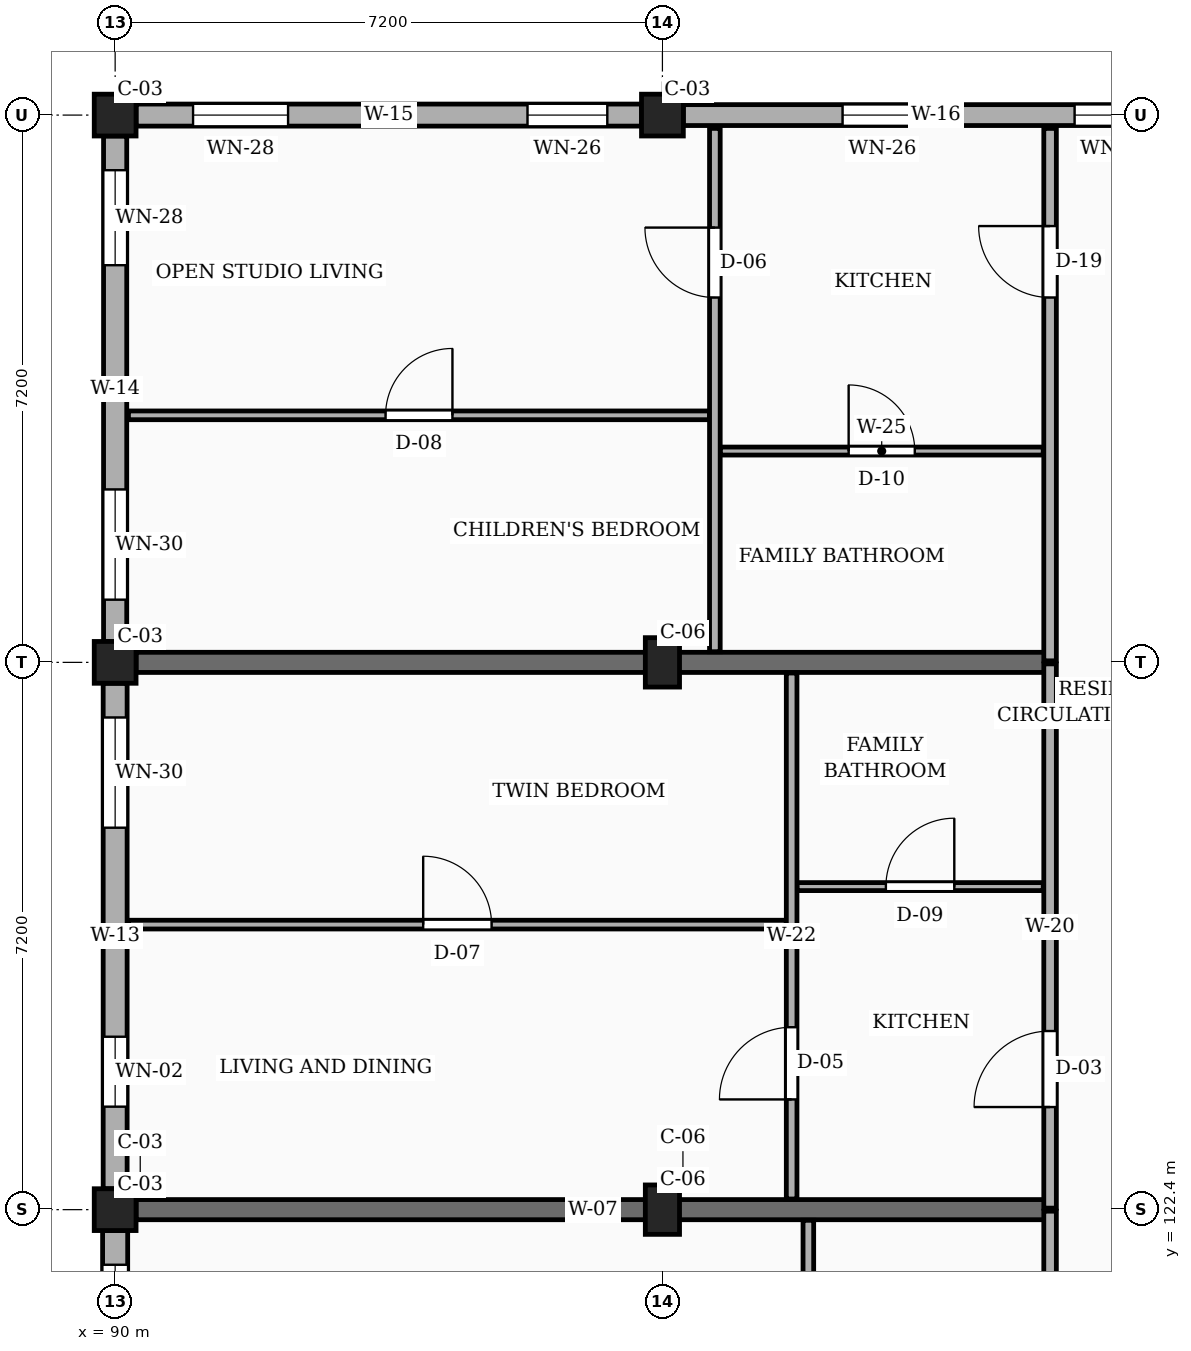
"""IFC4 building model, lengths in metres.
Left out: names, types, materials, properties, quantities, classifications, styles, units other than length and angle.
Written with IfcOpenShell. Run it as: python <this file> out.ifc"""

import sys

from ifc_helpers import new_model, si_unit, direction, frame, frame_2d, origin, origin_2d, place, context, subcontext, project, spatial, rectangle, extrude, element, fill, save


model = new_model("IFC4")
c1 = context("Model", 3, precision=1e-05, world=origin(), true_north=direction((0.0, 1.0)))
c2 = subcontext(c1, "Body", "Model", "MODEL_VIEW")
j1 = project(units=[si_unit("LENGTHUNIT", "METRE"), si_unit("PLANEANGLEUNIT", "RADIAN")], contexts=[c1])
p1 = place(None, origin())
s1 = spatial("IfcSite", under=j1, at=p1, CompositionType="ELEMENT")
p2 = place(p1, origin())
s2 = spatial("IfcBuilding", under=s1, at=p2, CompositionType="ELEMENT")
p3 = place(p2, frame((0.0, 0.0, 10.8)))
s3 = spatial("IfcBuildingStorey", under=s2, at=p3, CompositionType="ELEMENT", Elevation=10.8)
for number, where, z_axis, x_axis in (
    (1, (90.0, 122.4, 0.0), (0.0, 0.0, 1.0), (1.0, 0.0, 0.0)),
    (2, (90.0, 129.6, 0.0), (0.0, 0.0, 1.0), (1.0, 0.0, 0.0)),
    (3, (90.0, 136.8, 0.0), (0.0, 0.0, 1.0), (1.0, 0.0, 0.0)),
):
    element("IfcColumn", number, at=place(p3, frame(where, z_axis=z_axis, x_axis=x_axis)), inside=s3, PredefinedType="COLUMN", context=c2, shape_type="SweptSolid", body=[
        extrude(rectangle(XDim=0.55, YDim=0.55, at=origin_2d()), origin(), (0.0, 0.0, 1.0), 3.15),
    ])
for number, where, z_axis, x_axis in (
    (4, (97.2, 122.4, 0.0), (0.0, 0.0, 1.0), (1.0, 0.0, 0.0)),
    (5, (97.2, 129.6, 0.0), (0.0, 0.0, 1.0), (1.0, 0.0, 0.0)),
):
    element("IfcColumn", number, at=place(p3, frame(where, z_axis=z_axis, x_axis=x_axis)), inside=s3, PredefinedType="COLUMN", context=c2, shape_type="SweptSolid", body=[
        extrude(rectangle(XDim=0.45, YDim=0.65, at=origin_2d()), origin(), (0.0, 0.0, 1.0), 3.15),
    ])
p4 = place(p3, frame((97.2, 136.8, 0.0), z_axis=(0.0, 0.0, 1.0), x_axis=(1.0, 0.0, 0.0)))
e6 = element("IfcColumn", 6, at=p4, inside=s3, PredefinedType="COLUMN", context=c2, shape_type="SweptSolid", body=[
    extrude(rectangle(XDim=0.55, YDim=0.55, at=origin_2d()), origin(), (0.0, 0.0, 1.0), 3.15),
])
for number, where, z_axis, x_axis in (
    (7, (90.275, 122.4, 0.0), (0.0, 0.0, 1.0), (1.0, 0.0, 0.0)),
    (8, (90.275, 129.6, 0.0), (0.0, 0.0, 1.0), (1.0, 0.0, 0.0)),
):
    element("IfcWall", number, at=place(p3, frame(where, z_axis=z_axis, x_axis=x_axis)), inside=s3, PredefinedType="SOLIDWALL", context=c2, shape_type="SweptSolid", body=[
        extrude(rectangle(XDim=12.025, YDim=0.265, at=frame_2d((6.013, 0.0))), origin(), (0.0, 0.0, 1.0), 2.19),
    ])
p5 = place(p3, frame((104.125, 136.8, 0.0), z_axis=(0.0, 0.0, 1.0), x_axis=(-1.0, 0.0, 0.0)))
e9 = element("IfcWall", 9, at=p5, inside=s3, PredefinedType="SOLIDWALL", context=c2, shape_type="SweptSolid", body=[
    extrude(rectangle(XDim=6.65, YDim=0.275, at=frame_2d((3.325, 0.0))), origin(), (0.0, 0.0, 1.0), 2.46),
])
p6 = place(p5, frame((0.462, 0.0, 0.78)))
e10 = element("IfcOpeningElement", 10, at=p6, cuts=e9, PredefinedType="OPENING", context=c2, shape_type="SweptSolid", body=[
    extrude(rectangle(XDim=1.04, YDim=1.26, at=frame_2d((0.52, 0.63))), frame((0.0, 0.147, 0.0), z_axis=(0.0, -1.0, 0.0), x_axis=(1.0, 0.0, 0.0)), (0.0, 0.0, 1.0), 0.295),
])
p7 = place(p5, frame((3.505, 0.0, 0.78)))
e11 = element("IfcOpeningElement", 11, at=p7, cuts=e9, PredefinedType="OPENING", context=c2, shape_type="SweptSolid", body=[
    extrude(rectangle(XDim=1.05, YDim=1.44, at=frame_2d((0.525, 0.72))), frame((0.0, 0.147, 0.0), z_axis=(0.0, -1.0, 0.0), x_axis=(1.0, 0.0, 0.0)), (0.0, 0.0, 1.0), 0.295),
])
p8 = place(p3, frame((96.925, 136.8, 0.0), z_axis=(0.0, 0.0, 1.0), x_axis=(-1.0, 0.0, 0.0)))
e12 = element("IfcWall", 12, at=p8, inside=s3, PredefinedType="SOLIDWALL", context=c2, shape_type="SweptSolid", body=[
    extrude(rectangle(XDim=6.65, YDim=0.29, at=frame_2d((3.325, 0.0))), origin(), (0.0, 0.0, 1.0), 2.46),
])
p9 = place(p8, frame((0.45, 0.0, 0.78)))
e13 = element("IfcOpeningElement", 13, at=p9, cuts=e12, PredefinedType="OPENING", context=c2, shape_type="SweptSolid", body=[
    extrude(rectangle(XDim=1.05, YDim=1.44, at=frame_2d((0.525, 0.72))), frame((0.0, 0.155, 0.0), z_axis=(0.0, -1.0, 0.0), x_axis=(1.0, 0.0, 0.0)), (0.0, 0.0, 1.0), 0.31),
])
p10 = place(p8, frame((4.65, 0.0, 0.78)))
e14 = element("IfcOpeningElement", 14, at=p10, cuts=e12, PredefinedType="OPENING", context=c2, shape_type="SweptSolid", body=[
    extrude(rectangle(XDim=1.25, YDim=1.44, at=frame_2d((0.625, 0.72))), frame((0.0, 0.155, 0.0), z_axis=(0.0, -1.0, 0.0), x_axis=(1.0, 0.0, 0.0)), (0.0, 0.0, 1.0), 0.31),
])
p11 = place(p3, frame((90.0, 136.525, 0.0), z_axis=(0.0, 0.0, 1.0), x_axis=(0.0, -1.0, 0.0)))
e15 = element("IfcWall", 15, at=p11, inside=s3, PredefinedType="SOLIDWALL", context=c2, shape_type="SweptSolid", body=[
    extrude(rectangle(XDim=6.65, YDim=0.305, at=frame_2d((3.325, 0.0))), origin(), (0.0, 0.0, 1.0), 2.46),
])
p12 = place(p11, frame((0.45, 0.0, 0.78)))
e16 = element("IfcOpeningElement", 16, at=p12, cuts=e15, PredefinedType="OPENING", context=c2, shape_type="SweptSolid", body=[
    extrude(rectangle(XDim=1.25, YDim=1.44, at=frame_2d((0.625, 0.72))), frame((0.0, 0.163, 0.0), z_axis=(0.0, -1.0, 0.0), x_axis=(1.0, 0.0, 0.0)), (0.0, 0.0, 1.0), 0.325),
])
p13 = place(p11, frame((4.65, 0.0, 0.78)))
e17 = element("IfcOpeningElement", 17, at=p13, cuts=e15, PredefinedType="OPENING", context=c2, shape_type="SweptSolid", body=[
    extrude(rectangle(XDim=1.45, YDim=1.44, at=frame_2d((0.725, 0.72))), frame((0.0, 0.163, 0.0), z_axis=(0.0, -1.0, 0.0), x_axis=(1.0, 0.0, 0.0)), (0.0, 0.0, 1.0), 0.325),
])
p14 = place(p3, frame((90.0, 129.325, 0.0), z_axis=(0.0, 0.0, 1.0), x_axis=(0.0, -1.0, 0.0)))
e18 = element("IfcWall", 18, at=p14, inside=s3, PredefinedType="SOLIDWALL", context=c2, shape_type="SweptSolid", body=[
    extrude(rectangle(XDim=6.65, YDim=0.315, at=frame_2d((3.325, 0.0))), origin(), (0.0, 0.0, 1.0), 2.46),
])
p15 = place(p14, frame((0.45, 0.0, 0.78)))
e19 = element("IfcOpeningElement", 19, at=p15, cuts=e18, PredefinedType="OPENING", context=c2, shape_type="SweptSolid", body=[
    extrude(rectangle(XDim=1.45, YDim=1.44, at=frame_2d((0.725, 0.72))), frame((0.0, 0.167, 0.0), z_axis=(0.0, -1.0, 0.0), x_axis=(1.0, 0.0, 0.0)), (0.0, 0.0, 1.0), 0.335),
])
p16 = place(p14, frame((4.65, 0.0, 0.78)))
e20 = element("IfcOpeningElement", 20, at=p16, cuts=e18, PredefinedType="OPENING", context=c2, shape_type="SweptSolid", body=[
    extrude(rectangle(XDim=0.92, YDim=1.15, at=frame_2d((0.46, 0.575))), frame((0.0, 0.167, 0.0), z_axis=(0.0, -1.0, 0.0), x_axis=(1.0, 0.0, 0.0)), (0.0, 0.0, 1.0), 0.335),
])
p17 = place(p3, frame((90.0, 122.125, 0.0), z_axis=(0.0, 0.0, 1.0), x_axis=(0.0, -1.0, 0.0)))
e21 = element("IfcWall", 21, at=p17, inside=s3, PredefinedType="SOLIDWALL", context=c2, shape_type="SweptSolid", body=[
    extrude(rectangle(XDim=6.65, YDim=0.33, at=frame_2d((3.325, 0.0))), origin(), (0.0, 0.0, 1.0), 2.46),
])
p18 = place(p17, frame((0.45, 0.0, 0.78)))
e22 = element("IfcOpeningElement", 22, at=p18, cuts=e21, PredefinedType="OPENING", context=c2, shape_type="SweptSolid", body=[
    extrude(rectangle(XDim=0.92, YDim=1.15, at=frame_2d((0.46, 0.575))), frame((0.0, 0.175, 0.0), z_axis=(0.0, -1.0, 0.0), x_axis=(1.0, 0.0, 0.0)), (0.0, 0.0, 1.0), 0.35),
])
p19 = place(p17, frame((4.65, 0.0, 0.78)))
e23 = element("IfcOpeningElement", 23, at=p19, cuts=e21, PredefinedType="OPENING", context=c2, shape_type="SweptSolid", body=[
    extrude(rectangle(XDim=1.08, YDim=1.15, at=frame_2d((0.54, 0.575))), frame((0.0, 0.175, 0.0), z_axis=(0.0, -1.0, 0.0), x_axis=(1.0, 0.0, 0.0)), (0.0, 0.0, 1.0), 0.35),
])
p20 = place(p3, frame((102.3, 115.22, 0.0), z_axis=(0.0, 0.0, 1.0), x_axis=(0.0, 1.0, 0.0)))
e24 = element("IfcWall", 24, at=p20, inside=s3, PredefinedType="PARTITIONING", context=c2, shape_type="SweptSolid", body=[
    extrude(rectangle(XDim=7.16, YDim=0.165, at=frame_2d((3.58, 0.0))), origin(), (0.0, 0.0, 1.0), 2.325),
])
p21 = place(p20, frame((1.33, 0.0, 0.0)))
e25 = element("IfcOpeningElement", 25, at=p21, cuts=e24, PredefinedType="OPENING", context=c2, shape_type="SweptSolid", body=[
    extrude(rectangle(XDim=1.14, YDim=2.18, at=frame_2d((0.57, 1.09))), frame((0.0, 0.093, 0.0), z_axis=(0.0, -1.0, 0.0), x_axis=(1.0, 0.0, 0.0)), (0.0, 0.0, 1.0), 0.185),
])
p22 = place(p3, frame((102.3, 122.42, 0.0), z_axis=(0.0, 0.0, 1.0), x_axis=(0.0, 1.0, 0.0)))
e26 = element("IfcWall", 26, at=p22, inside=s3, PredefinedType="PARTITIONING", context=c2, shape_type="SweptSolid", body=[
    extrude(rectangle(XDim=7.16, YDim=0.165, at=frame_2d((3.58, 0.0))), origin(), (0.0, 0.0, 1.0), 2.325),
])
p23 = place(p22, frame((1.33, 0.0, 0.0)))
e27 = element("IfcOpeningElement", 27, at=p23, cuts=e26, PredefinedType="OPENING", context=c2, shape_type="SweptSolid", body=[
    extrude(rectangle(XDim=1.0, YDim=2.15, at=frame_2d((0.5, 1.075))), frame((0.0, 0.093, 0.0), z_axis=(0.0, -1.0, 0.0), x_axis=(1.0, 0.0, 0.0)), (0.0, 0.0, 1.0), 0.185),
])
p24 = place(p3, frame((102.3, 129.62, 0.0), z_axis=(0.0, 0.0, 1.0), x_axis=(0.0, 1.0, 0.0)))
e28 = element("IfcWall", 28, at=p24, inside=s3, PredefinedType="PARTITIONING", context=c2, shape_type="SweptSolid", body=[
    extrude(rectangle(XDim=7.005, YDim=0.165, at=frame_2d((3.502, 0.0))), origin(), (0.0, 0.0, 1.0), 2.325),
])
p25 = place(p24, frame((4.78, 0.0, 0.0)))
e29 = element("IfcOpeningElement", 29, at=p25, cuts=e28, PredefinedType="OPENING", context=c2, shape_type="SweptSolid", body=[
    extrude(rectangle(XDim=0.94, YDim=2.12, at=frame_2d((0.47, 1.06))), frame((0.0, 0.093, 0.0), z_axis=(0.0, -1.0, 0.0), x_axis=(1.0, 0.0, 0.0)), (0.0, 0.0, 1.0), 0.185),
])
p26 = place(p3, frame((99.12, 115.34, 0.0), z_axis=(0.0, 0.0, 1.0), x_axis=(0.0, 1.0, 0.0)))
e30 = element("IfcWall", 30, at=p26, inside=s3, PredefinedType="PARTITIONING", context=c2, shape_type="SweptSolid", body=[
    extrude(rectangle(XDim=6.92, YDim=0.14, at=frame_2d((3.46, 0.0))), origin(), (0.0, 0.0, 1.0), 2.325),
])
p27 = place(p26, frame((1.31, 0.0, 0.0)))
e31 = element("IfcOpeningElement", 31, at=p27, cuts=e30, PredefinedType="OPENING", context=c2, shape_type="SweptSolid", body=[
    extrude(rectangle(XDim=0.92, YDim=2.1, at=frame_2d((0.46, 1.05))), frame((0.0, 0.08, 0.0), z_axis=(0.0, -1.0, 0.0), x_axis=(1.0, 0.0, 0.0)), (0.0, 0.0, 1.0), 0.16),
])
p28 = place(p3, frame((90.175, 126.15, 0.0), z_axis=(0.0, 0.0, 1.0), x_axis=(1.0, 0.0, 0.0)))
e32 = element("IfcWall", 32, at=p28, inside=s3, PredefinedType="PARTITIONING", context=c2, shape_type="SweptSolid", body=[
    extrude(rectangle(XDim=8.655, YDim=0.115, at=frame_2d((4.328, 0.0))), origin(), (0.0, 0.0, 1.0), 2.325),
])
p29 = place(p28, frame((3.877, 0.0, 0.0)))
e33 = element("IfcOpeningElement", 33, at=p29, cuts=e32, PredefinedType="OPENING", context=c2, shape_type="SweptSolid", body=[
    extrude(rectangle(XDim=0.9, YDim=2.1, at=frame_2d((0.45, 1.05))), frame((0.0, 0.067, 0.0), z_axis=(0.0, -1.0, 0.0), x_axis=(1.0, 0.0, 0.0)), (0.0, 0.0, 1.0), 0.135),
])
p30 = place(p3, frame((98.97, 126.65, 0.0), z_axis=(0.0, 0.0, 1.0), x_axis=(1.0, 0.0, 0.0)))
e34 = element("IfcWall", 34, at=p30, inside=s3, PredefinedType="PARTITIONING", context=c2, shape_type="SweptSolid", body=[
    extrude(rectangle(XDim=3.24, YDim=0.105, at=frame_2d((1.62, 0.0))), origin(), (0.0, 0.0, 1.0), 2.325),
])
p31 = place(p30, frame((1.17, 0.0, 0.0)))
e35 = element("IfcOpeningElement", 35, at=p31, cuts=e34, PredefinedType="OPENING", context=c2, shape_type="SweptSolid", body=[
    extrude(rectangle(XDim=0.9, YDim=2.05, at=frame_2d((0.45, 1.025))), frame((0.0, 0.062, 0.0), z_axis=(0.0, -1.0, 0.0), x_axis=(1.0, 0.0, 0.0)), (0.0, 0.0, 1.0), 0.125),
])
p32 = place(p3, frame((98.9, 122.54, 0.0), z_axis=(0.0, 0.0, 1.0), x_axis=(0.0, 1.0, 0.0)))
e36 = element("IfcWall", 36, at=p32, inside=s3, PredefinedType="PARTITIONING", context=c2, shape_type="SweptSolid", body=[
    extrude(rectangle(XDim=6.92, YDim=0.14, at=frame_2d((3.46, 0.0))), origin(), (0.0, 0.0, 1.0), 2.325),
])
p33 = place(p32, frame((1.31, 0.0, 0.0)))
e37 = element("IfcOpeningElement", 37, at=p33, cuts=e36, PredefinedType="OPENING", context=c2, shape_type="SweptSolid", body=[
    extrude(rectangle(XDim=0.95, YDim=2.1, at=frame_2d((0.475, 1.05))), frame((0.0, 0.08, 0.0), z_axis=(0.0, -1.0, 0.0), x_axis=(1.0, 0.0, 0.0)), (0.0, 0.0, 1.0), 0.16),
])
p34 = place(p3, frame((90.175, 132.85, 0.0), z_axis=(0.0, 0.0, 1.0), x_axis=(1.0, 0.0, 0.0)))
e38 = element("IfcWall", 38, at=p34, inside=s3, PredefinedType="PARTITIONING", context=c2, shape_type="SweptSolid", body=[
    extrude(rectangle(XDim=7.645, YDim=0.115, at=frame_2d((3.823, 0.0))), origin(), (0.0, 0.0, 1.0), 2.325),
])
p35 = place(p34, frame((3.383, 0.0, 0.0)))
e39 = element("IfcOpeningElement", 39, at=p35, cuts=e38, PredefinedType="OPENING", context=c2, shape_type="SweptSolid", body=[
    extrude(rectangle(XDim=0.88, YDim=2.08, at=frame_2d((0.44, 1.04))), frame((0.0, 0.067, 0.0), z_axis=(0.0, -1.0, 0.0), x_axis=(1.0, 0.0, 0.0)), (0.0, 0.0, 1.0), 0.135),
])
p36 = place(p3, frame((97.96, 132.38, 0.0), z_axis=(0.0, 0.0, 1.0), x_axis=(1.0, 0.0, 0.0)))
e40 = element("IfcWall", 40, at=p36, inside=s3, PredefinedType="PARTITIONING", context=c2, shape_type="SweptSolid", body=[
    extrude(rectangle(XDim=4.25, YDim=0.105, at=frame_2d((2.125, 0.0))), origin(), (0.0, 0.0, 1.0), 2.325),
])
p37 = place(p36, frame((1.69, 0.0, 0.0)))
e41 = element("IfcOpeningElement", 41, at=p37, cuts=e40, PredefinedType="OPENING", context=c2, shape_type="SweptSolid", body=[
    extrude(rectangle(XDim=0.87, YDim=2.05, at=frame_2d((0.435, 1.025))), frame((0.0, 0.062, 0.0), z_axis=(0.0, -1.0, 0.0), x_axis=(1.0, 0.0, 0.0)), (0.0, 0.0, 1.0), 0.125),
])
p38 = place(p3, frame((97.89, 129.74, 0.0), z_axis=(0.0, 0.0, 1.0), x_axis=(0.0, 1.0, 0.0)))
e42 = element("IfcWall", 42, at=p38, inside=s3, PredefinedType="PARTITIONING", context=c2, shape_type="SweptSolid", body=[
    extrude(rectangle(XDim=6.885, YDim=0.14, at=frame_2d((3.442, 0.0))), origin(), (0.0, 0.0, 1.0), 2.325),
])
p39 = place(p38, frame((4.66, 0.0, 0.0)))
e43 = element("IfcOpeningElement", 43, at=p39, cuts=e42, PredefinedType="OPENING", context=c2, shape_type="SweptSolid", body=[
    extrude(rectangle(XDim=0.92, YDim=2.1, at=frame_2d((0.46, 1.05))), frame((0.0, 0.08, 0.0), z_axis=(0.0, -1.0, 0.0), x_axis=(1.0, 0.0, 0.0)), (0.0, 0.0, 1.0), 0.16),
])
p40 = place(p6, origin())
e44 = element("IfcWindow", 44, at=p40, inside=s3, PartitioningType="SINGLE_PANEL", PredefinedType="WINDOW", context=c2, shape_type="SweptSolid", body=[
    extrude(rectangle(XDim=1.04, YDim=1.26, at=frame_2d((0.52, 0.63))), frame((0.0, 0.03, 0.0), z_axis=(0.0, -1.0, 0.0), x_axis=(1.0, 0.0, 0.0)), (0.0, 0.0, 1.0), 0.06),
])
fill(e10, e44)
p41 = place(p7, origin())
e45 = element("IfcWindow", 45, at=p41, inside=s3, PartitioningType="SINGLE_PANEL", PredefinedType="WINDOW", context=c2, shape_type="SweptSolid", body=[
    extrude(rectangle(XDim=1.05, YDim=1.44, at=frame_2d((0.525, 0.72))), frame((0.0, 0.03, 0.0), z_axis=(0.0, -1.0, 0.0), x_axis=(1.0, 0.0, 0.0)), (0.0, 0.0, 1.0), 0.06),
])
fill(e11, e45)
p42 = place(p9, origin())
e46 = element("IfcWindow", 46, at=p42, inside=s3, PartitioningType="SINGLE_PANEL", PredefinedType="WINDOW", context=c2, shape_type="SweptSolid", body=[
    extrude(rectangle(XDim=1.05, YDim=1.44, at=frame_2d((0.525, 0.72))), frame((0.0, 0.03, 0.0), z_axis=(0.0, -1.0, 0.0), x_axis=(1.0, 0.0, 0.0)), (0.0, 0.0, 1.0), 0.06),
])
fill(e13, e46)
p43 = place(p10, origin())
e47 = element("IfcWindow", 47, at=p43, inside=s3, PartitioningType="SINGLE_PANEL", PredefinedType="WINDOW", context=c2, shape_type="SweptSolid", body=[
    extrude(rectangle(XDim=1.25, YDim=1.44, at=frame_2d((0.625, 0.72))), frame((0.0, 0.03, 0.0), z_axis=(0.0, -1.0, 0.0), x_axis=(1.0, 0.0, 0.0)), (0.0, 0.0, 1.0), 0.06),
])
fill(e14, e47)
p44 = place(p12, origin())
e48 = element("IfcWindow", 48, at=p44, inside=s3, PartitioningType="SINGLE_PANEL", PredefinedType="WINDOW", context=c2, shape_type="SweptSolid", body=[
    extrude(rectangle(XDim=1.25, YDim=1.44, at=frame_2d((0.625, 0.72))), frame((0.0, 0.03, 0.0), z_axis=(0.0, -1.0, 0.0), x_axis=(1.0, 0.0, 0.0)), (0.0, 0.0, 1.0), 0.06),
])
fill(e16, e48)
p45 = place(p13, origin())
e49 = element("IfcWindow", 49, at=p45, inside=s3, PartitioningType="SINGLE_PANEL", PredefinedType="WINDOW", context=c2, shape_type="SweptSolid", body=[
    extrude(rectangle(XDim=1.45, YDim=1.44, at=frame_2d((0.725, 0.72))), frame((0.0, 0.03, 0.0), z_axis=(0.0, -1.0, 0.0), x_axis=(1.0, 0.0, 0.0)), (0.0, 0.0, 1.0), 0.06),
])
fill(e17, e49)
p46 = place(p15, origin())
e50 = element("IfcWindow", 50, at=p46, inside=s3, PartitioningType="SINGLE_PANEL", PredefinedType="WINDOW", context=c2, shape_type="SweptSolid", body=[
    extrude(rectangle(XDim=1.45, YDim=1.44, at=frame_2d((0.725, 0.72))), frame((0.0, 0.03, 0.0), z_axis=(0.0, -1.0, 0.0), x_axis=(1.0, 0.0, 0.0)), (0.0, 0.0, 1.0), 0.06),
])
fill(e19, e50)
p47 = place(p16, origin())
e51 = element("IfcWindow", 51, at=p47, inside=s3, PartitioningType="SINGLE_PANEL", PredefinedType="WINDOW", context=c2, shape_type="SweptSolid", body=[
    extrude(rectangle(XDim=0.92, YDim=1.15, at=frame_2d((0.46, 0.575))), frame((0.0, 0.03, 0.0), z_axis=(0.0, -1.0, 0.0), x_axis=(1.0, 0.0, 0.0)), (0.0, 0.0, 1.0), 0.06),
])
fill(e20, e51)
p48 = place(p18, origin())
e52 = element("IfcWindow", 52, at=p48, inside=s3, PartitioningType="SINGLE_PANEL", PredefinedType="WINDOW", context=c2, shape_type="SweptSolid", body=[
    extrude(rectangle(XDim=0.92, YDim=1.15, at=frame_2d((0.46, 0.575))), frame((0.0, 0.03, 0.0), z_axis=(0.0, -1.0, 0.0), x_axis=(1.0, 0.0, 0.0)), (0.0, 0.0, 1.0), 0.06),
])
fill(e22, e52)
p49 = place(p23, origin())
e53 = element("IfcDoor", 53, at=p49, inside=s3, OperationType="SINGLE_SWING_LEFT", PredefinedType="DOOR", context=c2, shape_type="SweptSolid", body=[
    extrude(rectangle(XDim=1.0, YDim=2.15, at=frame_2d((0.5, 1.075))), frame((0.0, 0.025, 0.0), z_axis=(0.0, -1.0, 0.0), x_axis=(1.0, 0.0, 0.0)), (0.0, 0.0, 1.0), 0.05),
])
fill(e27, e53)
p50 = place(p25, origin())
e54 = element("IfcDoor", 54, at=p50, inside=s3, OperationType="SINGLE_SWING_RIGHT", PredefinedType="DOOR", context=c2, shape_type="SweptSolid", body=[
    extrude(rectangle(XDim=0.94, YDim=2.12, at=frame_2d((0.47, 1.06))), frame((0.0, 0.025, 0.0), z_axis=(0.0, -1.0, 0.0), x_axis=(1.0, 0.0, 0.0)), (0.0, 0.0, 1.0), 0.05),
])
fill(e29, e54)
p51 = place(p29, origin())
e55 = element("IfcDoor", 55, at=p51, inside=s3, OperationType="SINGLE_SWING_LEFT", PredefinedType="DOOR", context=c2, shape_type="SweptSolid", body=[
    extrude(rectangle(XDim=0.9, YDim=2.1, at=frame_2d((0.45, 1.05))), frame((0.0, 0.025, 0.0), z_axis=(0.0, -1.0, 0.0), x_axis=(1.0, 0.0, 0.0)), (0.0, 0.0, 1.0), 0.05),
])
fill(e33, e55)
p52 = place(p31, origin())
e56 = element("IfcDoor", 56, at=p52, inside=s3, OperationType="SINGLE_SWING_RIGHT", PredefinedType="DOOR", context=c2, shape_type="SweptSolid", body=[
    extrude(rectangle(XDim=0.9, YDim=2.05, at=frame_2d((0.45, 1.025))), frame((0.0, 0.025, 0.0), z_axis=(0.0, -1.0, 0.0), x_axis=(1.0, 0.0, 0.0)), (0.0, 0.0, 1.0), 0.05),
])
fill(e35, e56)
p53 = place(p33, origin())
e57 = element("IfcDoor", 57, at=p53, inside=s3, OperationType="SINGLE_SWING_LEFT", PredefinedType="DOOR", context=c2, shape_type="SweptSolid", body=[
    extrude(rectangle(XDim=0.95, YDim=2.1, at=frame_2d((0.475, 1.05))), frame((0.0, 0.025, 0.0), z_axis=(0.0, -1.0, 0.0), x_axis=(1.0, 0.0, 0.0)), (0.0, 0.0, 1.0), 0.05),
])
fill(e37, e57)
p54 = place(p35, origin())
e58 = element("IfcDoor", 58, at=p54, inside=s3, OperationType="SINGLE_SWING_RIGHT", PredefinedType="DOOR", context=c2, shape_type="SweptSolid", body=[
    extrude(rectangle(XDim=0.88, YDim=2.08, at=frame_2d((0.44, 1.04))), frame((0.0, 0.025, 0.0), z_axis=(0.0, -1.0, 0.0), x_axis=(1.0, 0.0, 0.0)), (0.0, 0.0, 1.0), 0.05),
])
fill(e39, e58)
p55 = place(p37, origin())
e59 = element("IfcDoor", 59, at=p55, inside=s3, OperationType="SINGLE_SWING_LEFT", PredefinedType="DOOR", context=c2, shape_type="SweptSolid", body=[
    extrude(rectangle(XDim=0.87, YDim=2.05, at=frame_2d((0.435, 1.025))), frame((0.0, 0.025, 0.0), z_axis=(0.0, -1.0, 0.0), x_axis=(1.0, 0.0, 0.0)), (0.0, 0.0, 1.0), 0.05),
])
fill(e41, e59)
p56 = place(p39, origin())
e60 = element("IfcDoor", 60, at=p56, inside=s3, OperationType="SINGLE_SWING_RIGHT", PredefinedType="DOOR", context=c2, shape_type="SweptSolid", body=[
    extrude(rectangle(XDim=0.92, YDim=2.1, at=frame_2d((0.46, 1.05))), frame((0.0, 0.025, 0.0), z_axis=(0.0, -1.0, 0.0), x_axis=(1.0, 0.0, 0.0)), (0.0, 0.0, 1.0), 0.05),
])
fill(e43, e60)
save(model, sys.argv[1])
